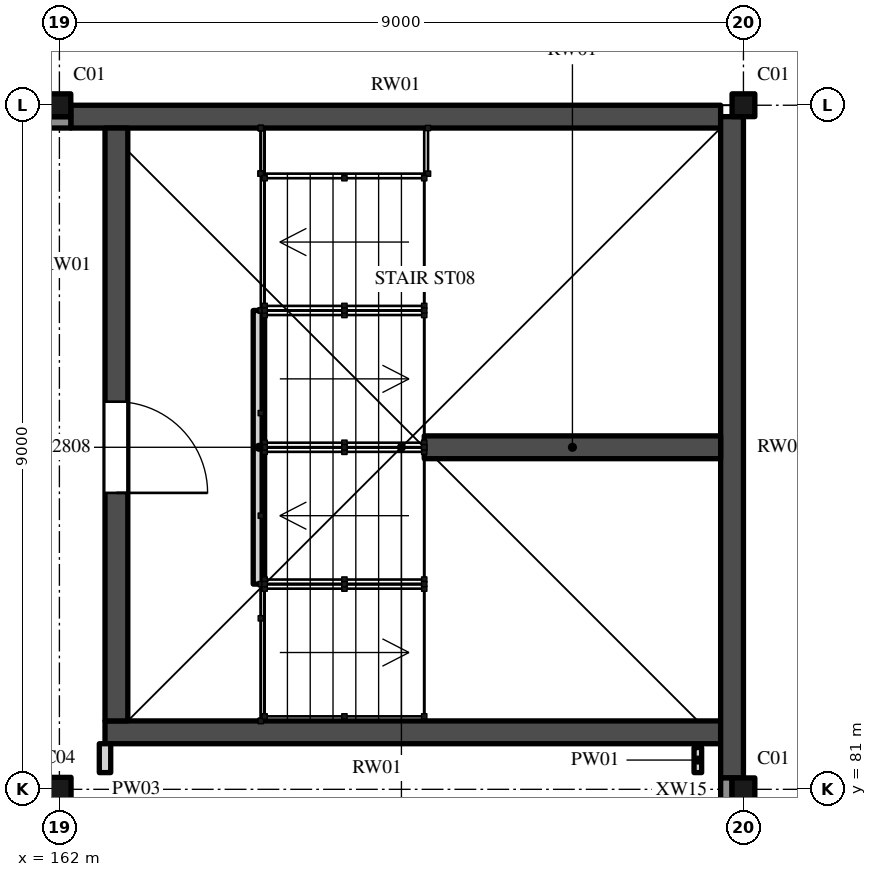
"""IFC4 building model, lengths in metres.
Left out: names, types, materials, properties, quantities, classifications, styles, units other than length and angle.
Written with IfcOpenShell. Run it as: python <this file> out.ifc"""

import sys

from ifc_helpers import new_model, si_unit, direction, frame, frame_2d, origin, origin_2d, place, context, subcontext, project, spatial, rectangle, hollow_rectangle, i_section, extrude, element, fill, save


model = new_model("IFC4")
c1 = context("Model", 3, precision=1e-05, world=origin(), true_north=direction((0.0, 1.0)))
c2 = subcontext(c1, "Body", "Model", "MODEL_VIEW")
j1 = project(units=[si_unit("LENGTHUNIT", "METRE"), si_unit("PLANEANGLEUNIT", "RADIAN")], contexts=[c1])
p1 = place(None, origin())
s1 = spatial("IfcSite", under=j1, at=p1, CompositionType="ELEMENT")
p2 = place(p1, origin())
s2 = spatial("IfcBuilding", under=s1, at=p2, CompositionType="ELEMENT")
p3 = place(p2, frame((0.0, 0.0, 11.0)))
s3 = spatial("IfcBuildingStorey", under=s2, at=p3, CompositionType="ELEMENT", Elevation=11.0)
p4 = place(p3, frame((162.0, 81.0, 0.0), z_axis=(0.0, 0.0, 1.0), x_axis=(1.0, 0.0, 0.0)))
e1 = element("IfcColumn", 1, at=p4, inside=s3, PredefinedType="COLUMN", context=c2, shape_type="SweptSolid", body=[
    extrude(i_section(OverallWidth=0.307, OverallDepth=0.315, WebThickness=0.012, FlangeThickness=0.019, FilletRadius=0.017, at=origin_2d()), origin(), (0.0, 0.0, 1.0), 5.0),
])
for number, where, z_axis, x_axis in (
    (2, (171.0, 81.0, 0.0), (0.0, 0.0, 1.0), (1.0, 0.0, 0.0)),
    (3, (162.0, 90.0, 0.0), (0.0, 0.0, 1.0), (1.0, 0.0, 0.0)),
    (4, (171.0, 90.0, 0.0), (0.0, 0.0, 1.0), (1.0, 0.0, 0.0)),
):
    element("IfcColumn", number, at=place(p3, frame(where, z_axis=z_axis, x_axis=x_axis)), inside=s3, PredefinedType="COLUMN", context=c2, shape_type="SweptSolid", body=[
        extrude(hollow_rectangle(XDim=0.3, YDim=0.3, WallThickness=0.012, InnerFilletRadius=0.019, OuterFilletRadius=0.031, at=origin_2d()), origin(), (0.0, 0.0, 1.0), 5.0),
    ])
p5 = place(p3, frame((162.6, 81.75, 0.0), z_axis=(0.0, 0.0, 1.0), x_axis=(1.0, 0.0, 0.0)))
e5 = element("IfcWall", 5, at=p5, inside=s3, PredefinedType="SHEAR", context=c2, shape_type="SweptSolid", body=[
    extrude(rectangle(XDim=8.1, YDim=0.3, at=frame_2d((4.05, 0.0))), origin(), (0.0, 0.0, 1.0), 5.0),
])
p6 = place(p3, frame((162.15, 89.85, 0.0), z_axis=(0.0, 0.0, 1.0), x_axis=(1.0, 0.0, 0.0)))
e6 = element("IfcWall", 6, at=p6, inside=s3, PredefinedType="SHEAR", context=c2, shape_type="SweptSolid", body=[
    extrude(rectangle(XDim=8.55, YDim=0.3, at=frame_2d((4.275, 0.0))), origin(), (0.0, 0.0, 1.0), 5.0),
])
p7 = place(p3, frame((162.75, 81.9, 0.0), z_axis=(0.0, 0.0, 1.0), x_axis=(0.0, 1.0, 0.0)))
e7 = element("IfcWall", 7, at=p7, inside=s3, PredefinedType="SHEAR", context=c2, shape_type="SweptSolid", body=[
    extrude(rectangle(XDim=7.8, YDim=0.3, at=frame_2d((3.9, 0.0))), origin(), (0.0, 0.0, 1.0), 5.0),
])
p8 = place(p7, frame((3.0, 0.0, 0.0)))
e8 = element("IfcOpeningElement", 8, at=p8, cuts=e7, PredefinedType="OPENING", context=c2, shape_type="SweptSolid", body=[
    extrude(rectangle(XDim=1.2, YDim=2.1, at=frame_2d((0.6, 1.05))), frame((0.0, 0.16, 0.0), z_axis=(0.0, -1.0, 0.0), x_axis=(1.0, 0.0, 0.0)), (0.0, 0.0, 1.0), 0.32),
])
p9 = place(p3, frame((170.85, 81.15, 0.0), z_axis=(0.0, 0.0, 1.0), x_axis=(0.0, 1.0, 0.0)))
e9 = element("IfcWall", 9, at=p9, inside=s3, PredefinedType="SHEAR", context=c2, shape_type="SweptSolid", body=[
    extrude(rectangle(XDim=8.7, YDim=0.3, at=frame_2d((4.35, 0.0))), origin(), (0.0, 0.0, 1.0), 5.0),
])
p10 = place(p3, frame((166.8, 85.5, 0.0), z_axis=(0.0, 0.0, 1.0), x_axis=(1.0, 0.0, 0.0)))
e10 = element("IfcWall", 10, at=p10, inside=s3, PredefinedType="SHEAR", context=c2, shape_type="SweptSolid", body=[
    extrude(rectangle(XDim=3.9, YDim=0.3, at=frame_2d((1.95, 0.0))), origin(), (0.0, 0.0, 1.0), 5.0),
])
p11 = place(p3, frame((164.625, 83.7, 0.0), z_axis=(0.0, 0.0, 1.0), x_axis=(0.0, 1.0, 0.0)))
e11 = element("IfcWall", 11, at=p11, inside=s3, PredefinedType="STANDARD", context=c2, shape_type="SweptSolid", body=[
    extrude(rectangle(XDim=3.6, YDim=0.15, at=frame_2d((1.8, 0.0))), origin(), (0.0, 0.0, 1.0), 2.3),
])
for number, where, z_axis, x_axis in (
    (12, (161.828, 89.775, 0.0), (0.0, 0.0, 1.0), (1.0, 0.0, 0.0)),
    (13, (170.775, 80.828, 0.0), (0.0, 0.0, 1.0), (0.0, 1.0, 0.0)),
):
    element("IfcWall", number, at=place(p3, frame(where, z_axis=z_axis, x_axis=x_axis)), inside=s3, PredefinedType="SOLIDWALL", context=c2, shape_type="SweptSolid", body=[
        extrude(rectangle(XDim=0.322, YDim=0.15, at=frame_2d((0.161, 0.0))), origin(), (0.0, 0.0, 1.0), 5.0),
    ])
p12 = place(p3, frame((162.6, 81.22, 0.0), z_axis=(0.0, 0.0, 1.0), x_axis=(0.0, 1.0, 0.0)))
e14 = element("IfcWall", 14, at=p12, inside=s3, PredefinedType="PARTITIONING", context=c2, shape_type="SweptSolid", body=[
    extrude(rectangle(XDim=0.38, YDim=0.15, at=frame_2d((0.19, 0.0))), origin(), (0.0, 0.0, 1.0), 4.825),
])
p13 = place(p3, frame((170.4, 81.22, 0.0), z_axis=(0.0, 0.0, 1.0), x_axis=(0.0, 1.0, 0.0)))
e15 = element("IfcWall", 15, at=p13, inside=s3, PredefinedType="PARTITIONING", context=c2, shape_type="SweptSolid", body=[
    extrude(rectangle(XDim=0.33, YDim=0.1, at=frame_2d((0.165, 0.0))), origin(), (0.0, 0.0, 1.0), 4.825),
])
p14 = place(p8, origin())
e16 = element("IfcDoor", 16, at=p14, inside=s3, OperationType="SINGLE_SWING_LEFT", PredefinedType="DOOR", context=c2, shape_type="SweptSolid", body=[
    extrude(rectangle(XDim=1.2, YDim=2.1, at=frame_2d((0.6, 1.05))), frame((0.0, 0.025, 0.0), z_axis=(0.0, -1.0, 0.0), x_axis=(1.0, 0.0, 0.0)), (0.0, 0.0, 1.0), 0.05),
])
fill(e8, e16)
save(model, sys.argv[1])
